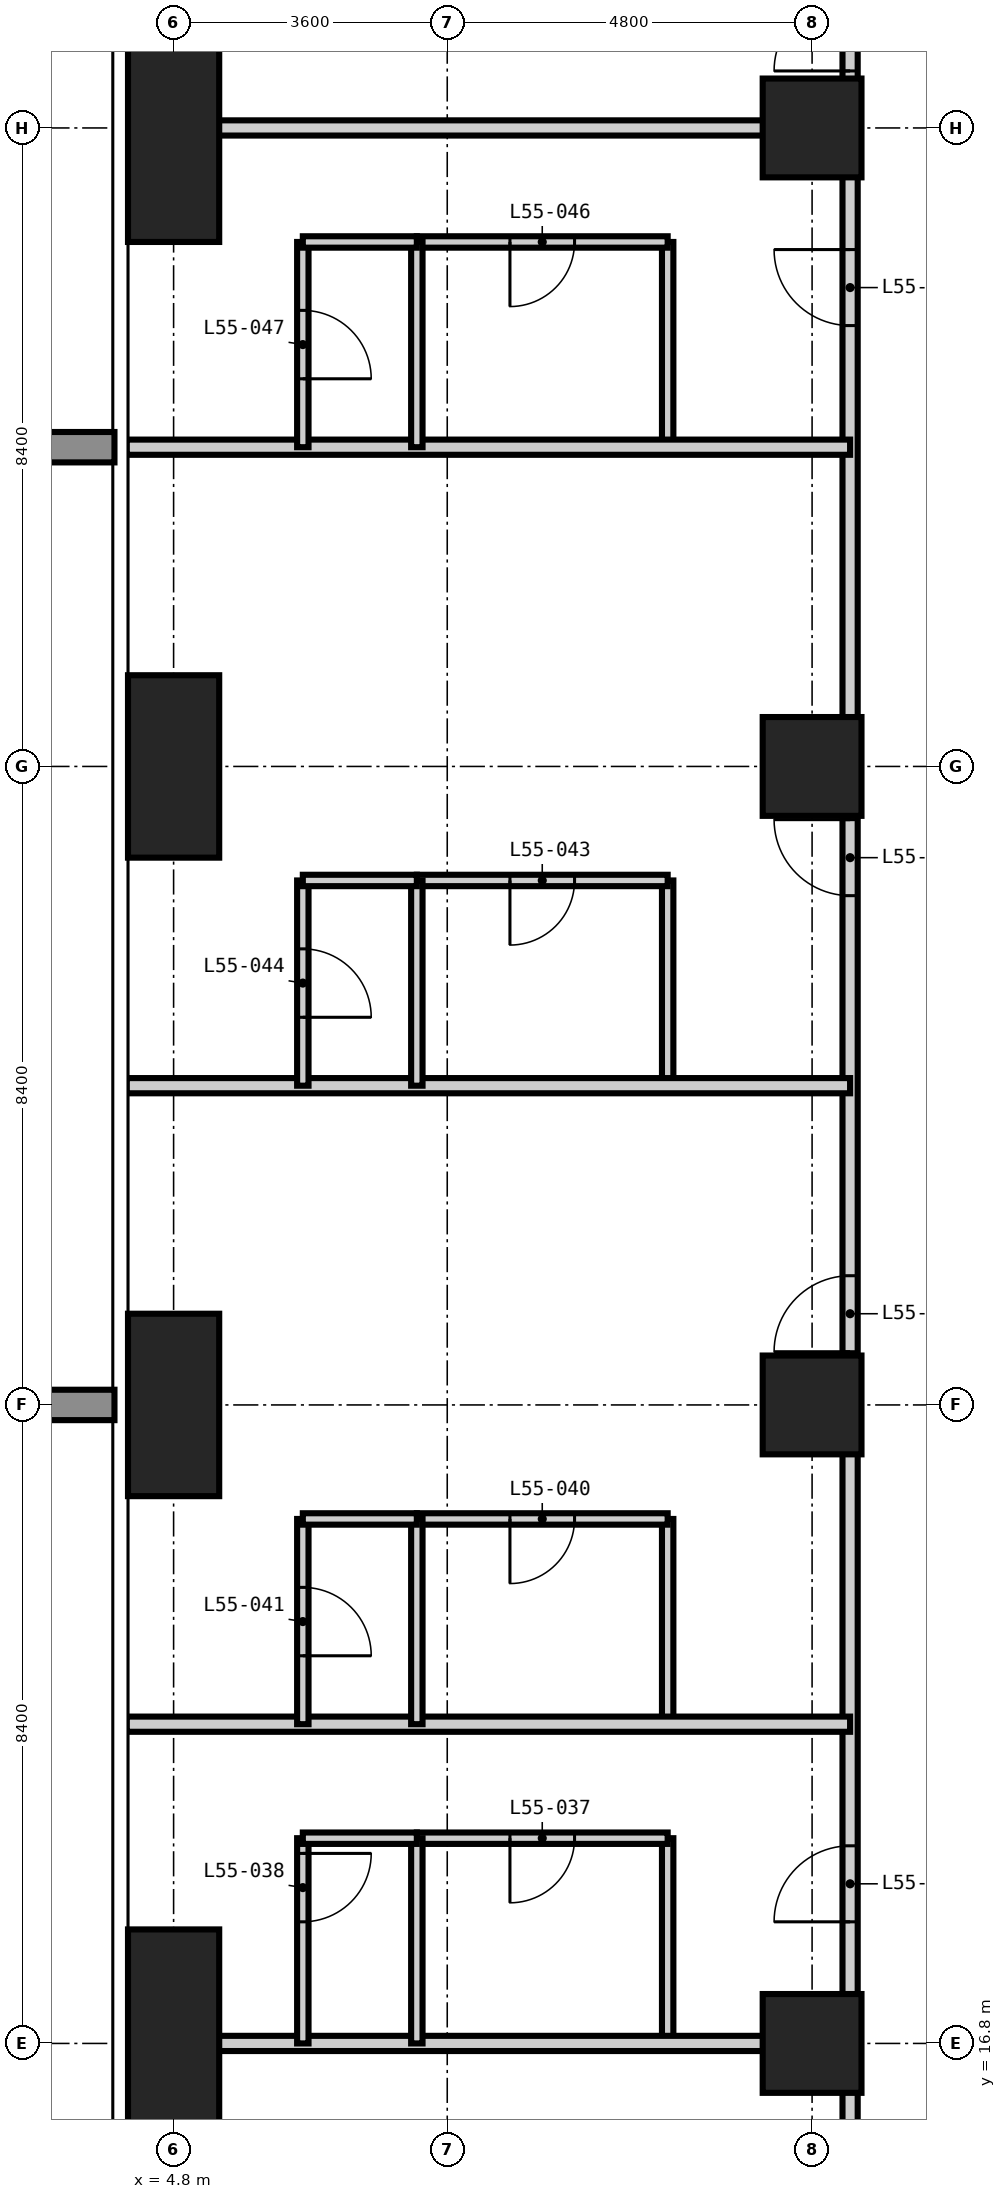
"""IFC4 building model, lengths in metres.
Left out: names, types, materials, properties, quantities, classifications, styles, units other than length and angle.
Written with IfcOpenShell. Run it as: python <this file> out.ifc"""

import sys

from ifc_helpers import new_model, si_unit, direction, frame, frame_2d, origin, origin_2d, place, context, subcontext, project, spatial, rectangle, extrude, element, fill, save


model = new_model("IFC4")
c1 = context("Model", 3, precision=1e-05, world=origin(), true_north=direction((0.0, 1.0)))
c2 = subcontext(c1, "Body", "Model", "MODEL_VIEW")
j1 = project(units=[si_unit("LENGTHUNIT", "METRE"), si_unit("PLANEANGLEUNIT", "RADIAN")], contexts=[c1])
p1 = place(None, origin())
s1 = spatial("IfcSite", under=j1, at=p1, CompositionType="ELEMENT")
p2 = place(p1, origin())
s2 = spatial("IfcBuilding", under=s1, at=p2, CompositionType="ELEMENT")
p3 = place(p2, frame((0.0, 0.0, 213.0)))
s3 = spatial("IfcBuildingStorey", under=s2, at=p3, CompositionType="ELEMENT", Elevation=213.0)
p4 = place(p3, frame((4.8, 16.8, -0.35), z_axis=(0.0, 0.0, 1.0), x_axis=(1.0, 0.0, 0.0)))
e1 = element("IfcColumn", 1, at=p4, inside=s3, PredefinedType="COLUMN", context=c2, shape_type="SweptSolid", body=[
    extrude(rectangle(XDim=1.2, YDim=3.0, at=origin_2d()), origin(), (0.0, 0.0, 1.0), 3.6),
])
for number, where, z_axis, x_axis in (
    (2, (4.8, 25.2, -0.35), (0.0, 0.0, 1.0), (1.0, 0.0, 0.0)),
    (3, (4.8, 33.6, -0.35), (0.0, 0.0, 1.0), (1.0, 0.0, 0.0)),
):
    element("IfcColumn", number, at=place(p3, frame(where, z_axis=z_axis, x_axis=x_axis)), inside=s3, PredefinedType="COLUMN", context=c2, shape_type="SweptSolid", body=[
        extrude(rectangle(XDim=1.2, YDim=2.4, at=origin_2d()), origin(), (0.0, 0.0, 1.0), 3.6),
    ])
p5 = place(p3, frame((4.8, 42.0, -0.35), z_axis=(0.0, 0.0, 1.0), x_axis=(1.0, 0.0, 0.0)))
e4 = element("IfcColumn", 4, at=p5, inside=s3, PredefinedType="COLUMN", context=c2, shape_type="SweptSolid", body=[
    extrude(rectangle(XDim=1.2, YDim=3.0, at=origin_2d()), origin(), (0.0, 0.0, 1.0), 3.6),
])
for number, where, z_axis, x_axis in (
    (5, (13.2, 16.8, -0.35), (0.0, 0.0, 1.0), (1.0, 0.0, 0.0)),
    (6, (13.2, 25.2, -0.35), (0.0, 0.0, 1.0), (1.0, 0.0, 0.0)),
    (7, (13.2, 33.6, -0.35), (0.0, 0.0, 1.0), (1.0, 0.0, 0.0)),
    (8, (13.2, 42.0, -0.35), (0.0, 0.0, 1.0), (1.0, 0.0, 0.0)),
):
    element("IfcColumn", number, at=place(p3, frame(where, z_axis=z_axis, x_axis=x_axis)), inside=s3, PredefinedType="COLUMN", context=c2, shape_type="SweptSolid", body=[
        extrude(rectangle(XDim=1.3, YDim=1.3, at=origin_2d()), origin(), (0.0, 0.0, 1.0), 3.6),
    ])
for number, where, z_axis, x_axis in (
    (9, (11.3, 16.8, 0.0), (0.0, 0.0, 1.0), (0.0, 1.0, 0.0)),
    (10, (11.3, 21.0, 0.0), (0.0, 0.0, 1.0), (0.0, 1.0, 0.0)),
):
    element("IfcWall", number, at=place(p3, frame(where, z_axis=z_axis, x_axis=x_axis)), inside=s3, PredefinedType="PARTITIONING", context=c2, shape_type="SweptSolid", body=[
        extrude(rectangle(XDim=2.7, YDim=0.15, at=frame_2d((1.35, 0.0))), origin(), (0.0, 0.0, 1.0), 3.25),
    ])
p6 = place(p3, frame((11.3, 29.4, 0.0), z_axis=(0.0, 0.0, 1.0), x_axis=(0.0, 1.0, 0.0)))
e11 = element("IfcWall", 11, at=p6, inside=s3, PredefinedType="PARTITIONING", context=c2, shape_type="SweptSolid", body=[
    extrude(rectangle(XDim=2.7, YDim=0.15, at=frame_2d((1.35, 0.0))), origin(), (0.0, 0.0, 1.0), 3.25),
])
p7 = place(p3, frame((11.3, 37.8, 0.0), z_axis=(0.0, 0.0, 1.0), x_axis=(0.0, 1.0, 0.0)))
e12 = element("IfcWall", 12, at=p7, inside=s3, PredefinedType="PARTITIONING", context=c2, shape_type="SweptSolid", body=[
    extrude(rectangle(XDim=2.7, YDim=0.15, at=frame_2d((1.35, 0.0))), origin(), (0.0, 0.0, 1.0), 3.25),
])
p8 = place(p3, frame((8.0, 19.5, 0.0), z_axis=(0.0, 0.0, 1.0), x_axis=(1.0, 0.0, 0.0)))
e13 = element("IfcWall", 13, at=p8, inside=s3, PredefinedType="PARTITIONING", context=c2, shape_type="SweptSolid", body=[
    extrude(rectangle(XDim=3.3, YDim=0.15, at=frame_2d((1.65, 0.0))), origin(), (0.0, 0.0, 1.0), 3.25),
])
p9 = place(p8, frame((1.225, 0.0, 0.0)))
e14 = element("IfcOpeningElement", 14, at=p9, cuts=e13, PredefinedType="OPENING", context=c2, shape_type="SweptSolid", body=[
    extrude(rectangle(XDim=0.85, YDim=2.1, at=frame_2d((0.425, 1.05))), frame((0.0, 0.085, 0.0), z_axis=(0.0, -1.0, 0.0), x_axis=(1.0, 0.0, 0.0)), (0.0, 0.0, 1.0), 0.17),
])
p10 = place(p3, frame((8.0, 23.7, 0.0), z_axis=(0.0, 0.0, 1.0), x_axis=(1.0, 0.0, 0.0)))
e15 = element("IfcWall", 15, at=p10, inside=s3, PredefinedType="PARTITIONING", context=c2, shape_type="SweptSolid", body=[
    extrude(rectangle(XDim=3.3, YDim=0.15, at=frame_2d((1.65, 0.0))), origin(), (0.0, 0.0, 1.0), 3.25),
])
p11 = place(p10, frame((1.225, 0.0, 0.0)))
e16 = element("IfcOpeningElement", 16, at=p11, cuts=e15, PredefinedType="OPENING", context=c2, shape_type="SweptSolid", body=[
    extrude(rectangle(XDim=0.85, YDim=2.1, at=frame_2d((0.425, 1.05))), frame((0.0, 0.085, 0.0), z_axis=(0.0, -1.0, 0.0), x_axis=(1.0, 0.0, 0.0)), (0.0, 0.0, 1.0), 0.17),
])
p12 = place(p3, frame((8.0, 32.1, 0.0), z_axis=(0.0, 0.0, 1.0), x_axis=(1.0, 0.0, 0.0)))
e17 = element("IfcWall", 17, at=p12, inside=s3, PredefinedType="PARTITIONING", context=c2, shape_type="SweptSolid", body=[
    extrude(rectangle(XDim=3.3, YDim=0.15, at=frame_2d((1.65, 0.0))), origin(), (0.0, 0.0, 1.0), 3.25),
])
p13 = place(p12, frame((1.225, 0.0, 0.0)))
e18 = element("IfcOpeningElement", 18, at=p13, cuts=e17, PredefinedType="OPENING", context=c2, shape_type="SweptSolid", body=[
    extrude(rectangle(XDim=0.85, YDim=2.1, at=frame_2d((0.425, 1.05))), frame((0.0, 0.085, 0.0), z_axis=(0.0, -1.0, 0.0), x_axis=(1.0, 0.0, 0.0)), (0.0, 0.0, 1.0), 0.17),
])
p14 = place(p3, frame((8.0, 40.5, 0.0), z_axis=(0.0, 0.0, 1.0), x_axis=(1.0, 0.0, 0.0)))
e19 = element("IfcWall", 19, at=p14, inside=s3, PredefinedType="PARTITIONING", context=c2, shape_type="SweptSolid", body=[
    extrude(rectangle(XDim=3.3, YDim=0.15, at=frame_2d((1.65, 0.0))), origin(), (0.0, 0.0, 1.0), 3.25),
])
p15 = place(p14, frame((1.225, 0.0, 0.0)))
e20 = element("IfcOpeningElement", 20, at=p15, cuts=e19, PredefinedType="OPENING", context=c2, shape_type="SweptSolid", body=[
    extrude(rectangle(XDim=0.85, YDim=2.1, at=frame_2d((0.425, 1.05))), frame((0.0, 0.085, 0.0), z_axis=(0.0, -1.0, 0.0), x_axis=(1.0, 0.0, 0.0)), (0.0, 0.0, 1.0), 0.17),
])
p16 = place(p3, frame((13.7, 13.7, 0.0), z_axis=(0.0, 0.0, 1.0), x_axis=(0.0, 1.0, 0.0)))
e21 = element("IfcWall", 21, at=p16, inside=s3, PredefinedType="PARTITIONING", context=c2, shape_type="SweptSolid", body=[
    extrude(rectangle(XDim=30.8, YDim=0.2, at=frame_2d((15.4, 0.0))), origin(), (0.0, 0.0, 1.0), 3.25),
])
p17 = place(p16, frame((4.7, 0.0, 0.0)))
e22 = element("IfcOpeningElement", 22, at=p17, cuts=e21, PredefinedType="OPENING", context=c2, shape_type="SweptSolid", body=[
    extrude(rectangle(XDim=1.0, YDim=2.2, at=frame_2d((0.5, 1.1))), frame((0.0, 0.11, 0.0), z_axis=(0.0, -1.0, 0.0), x_axis=(1.0, 0.0, 0.0)), (0.0, 0.0, 1.0), 0.22),
])
p18 = place(p16, frame((12.2, 0.0, 0.0)))
e23 = element("IfcOpeningElement", 23, at=p18, cuts=e21, PredefinedType="OPENING", context=c2, shape_type="SweptSolid", body=[
    extrude(rectangle(XDim=1.0, YDim=2.2, at=frame_2d((0.5, 1.1))), frame((0.0, 0.11, 0.0), z_axis=(0.0, -1.0, 0.0), x_axis=(1.0, 0.0, 0.0)), (0.0, 0.0, 1.0), 0.22),
])
p19 = place(p16, frame((18.2, 0.0, 0.0)))
e24 = element("IfcOpeningElement", 24, at=p19, cuts=e21, PredefinedType="OPENING", context=c2, shape_type="SweptSolid", body=[
    extrude(rectangle(XDim=1.0, YDim=2.2, at=frame_2d((0.5, 1.1))), frame((0.0, 0.11, 0.0), z_axis=(0.0, -1.0, 0.0), x_axis=(1.0, 0.0, 0.0)), (0.0, 0.0, 1.0), 0.22),
])
p20 = place(p16, frame((25.7, 0.0, 0.0)))
e25 = element("IfcOpeningElement", 25, at=p20, cuts=e21, PredefinedType="OPENING", context=c2, shape_type="SweptSolid", body=[
    extrude(rectangle(XDim=1.0, YDim=2.2, at=frame_2d((0.5, 1.1))), frame((0.0, 0.11, 0.0), z_axis=(0.0, -1.0, 0.0), x_axis=(1.0, 0.0, 0.0)), (0.0, 0.0, 1.0), 0.22),
])
p21 = place(p16, frame((1.05, 0.0, 0.0)))
e26 = element("IfcOpeningElement", 26, at=p21, cuts=e21, PredefinedType="OPENING", context=c2, shape_type="SweptSolid", body=[
    extrude(rectangle(XDim=1.0, YDim=2.2, at=frame_2d((0.5, 1.1))), frame((0.0, 0.11, 0.0), z_axis=(0.0, -1.0, 0.0), x_axis=(1.0, 0.0, 0.0)), (0.0, 0.0, 1.0), 0.22),
])
p22 = place(p16, frame((29.05, 0.0, 0.0)))
e27 = element("IfcOpeningElement", 27, at=p22, cuts=e21, PredefinedType="OPENING", context=c2, shape_type="SweptSolid", body=[
    extrude(rectangle(XDim=1.0, YDim=2.2, at=frame_2d((0.5, 1.1))), frame((0.0, 0.11, 0.0), z_axis=(0.0, -1.0, 0.0), x_axis=(1.0, 0.0, 0.0)), (0.0, 0.0, 1.0), 0.22),
])
for number, where, z_axis, x_axis in (
    (28, (4.182, 16.8, 0.0), (0.0, 0.0, 1.0), (1.0, 0.0, 0.0)),
    (29, (4.182, 21.0, 0.0), (0.0, 0.0, 1.0), (1.0, 0.0, 0.0)),
    (30, (4.182, 29.4, 0.0), (0.0, 0.0, 1.0), (1.0, 0.0, 0.0)),
    (31, (4.182, 37.8, 0.0), (0.0, 0.0, 1.0), (1.0, 0.0, 0.0)),
    (32, (4.182, 42.0, 0.0), (0.0, 0.0, 1.0), (1.0, 0.0, 0.0)),
):
    element("IfcWall", number, at=place(p3, frame(where, z_axis=z_axis, x_axis=x_axis)), inside=s3, PredefinedType="PARTITIONING", context=c2, shape_type="SweptSolid", body=[
        extrude(rectangle(XDim=9.518, YDim=0.2, at=frame_2d((4.759, 0.0))), origin(), (0.0, 0.0, 1.0), 3.25),
    ])
p23 = place(p3, frame((6.5, 16.8, 0.0), z_axis=(0.0, 0.0, 1.0), x_axis=(0.0, 1.0, 0.0)))
e33 = element("IfcWall", 33, at=p23, inside=s3, PredefinedType="PARTITIONING", context=c2, shape_type="SweptSolid", body=[
    extrude(rectangle(XDim=2.7, YDim=0.15, at=frame_2d((1.35, 0.0))), origin(), (0.0, 0.0, 1.0), 3.25),
])
p24 = place(p23, frame((1.6, 0.0, 0.0)))
e34 = element("IfcOpeningElement", 34, at=p24, cuts=e33, PredefinedType="OPENING", context=c2, shape_type="SweptSolid", body=[
    extrude(rectangle(XDim=0.9, YDim=2.1, at=frame_2d((0.45, 1.05))), frame((0.0, 0.085, 0.0), z_axis=(0.0, -1.0, 0.0), x_axis=(1.0, 0.0, 0.0)), (0.0, 0.0, 1.0), 0.17),
])
p25 = place(p3, frame((6.5, 21.0, 0.0), z_axis=(0.0, 0.0, 1.0), x_axis=(0.0, 1.0, 0.0)))
e35 = element("IfcWall", 35, at=p25, inside=s3, PredefinedType="PARTITIONING", context=c2, shape_type="SweptSolid", body=[
    extrude(rectangle(XDim=2.7, YDim=0.15, at=frame_2d((1.35, 0.0))), origin(), (0.0, 0.0, 1.0), 3.25),
])
p26 = place(p25, frame((0.9, 0.0, 0.0)))
e36 = element("IfcOpeningElement", 36, at=p26, cuts=e35, PredefinedType="OPENING", context=c2, shape_type="SweptSolid", body=[
    extrude(rectangle(XDim=0.9, YDim=2.1, at=frame_2d((0.45, 1.05))), frame((0.0, 0.085, 0.0), z_axis=(0.0, -1.0, 0.0), x_axis=(1.0, 0.0, 0.0)), (0.0, 0.0, 1.0), 0.17),
])
p27 = place(p3, frame((6.5, 29.4, 0.0), z_axis=(0.0, 0.0, 1.0), x_axis=(0.0, 1.0, 0.0)))
e37 = element("IfcWall", 37, at=p27, inside=s3, PredefinedType="PARTITIONING", context=c2, shape_type="SweptSolid", body=[
    extrude(rectangle(XDim=2.7, YDim=0.15, at=frame_2d((1.35, 0.0))), origin(), (0.0, 0.0, 1.0), 3.25),
])
p28 = place(p27, frame((0.9, 0.0, 0.0)))
e38 = element("IfcOpeningElement", 38, at=p28, cuts=e37, PredefinedType="OPENING", context=c2, shape_type="SweptSolid", body=[
    extrude(rectangle(XDim=0.9, YDim=2.1, at=frame_2d((0.45, 1.05))), frame((0.0, 0.085, 0.0), z_axis=(0.0, -1.0, 0.0), x_axis=(1.0, 0.0, 0.0)), (0.0, 0.0, 1.0), 0.17),
])
p29 = place(p3, frame((6.5, 37.8, 0.0), z_axis=(0.0, 0.0, 1.0), x_axis=(0.0, 1.0, 0.0)))
e39 = element("IfcWall", 39, at=p29, inside=s3, PredefinedType="PARTITIONING", context=c2, shape_type="SweptSolid", body=[
    extrude(rectangle(XDim=2.7, YDim=0.15, at=frame_2d((1.35, 0.0))), origin(), (0.0, 0.0, 1.0), 3.25),
])
p30 = place(p29, frame((0.9, 0.0, 0.0)))
e40 = element("IfcOpeningElement", 40, at=p30, cuts=e39, PredefinedType="OPENING", context=c2, shape_type="SweptSolid", body=[
    extrude(rectangle(XDim=0.9, YDim=2.1, at=frame_2d((0.45, 1.05))), frame((0.0, 0.085, 0.0), z_axis=(0.0, -1.0, 0.0), x_axis=(1.0, 0.0, 0.0)), (0.0, 0.0, 1.0), 0.17),
])
for number, where, z_axis, x_axis in (
    (41, (8.0, 16.8, 0.0), (0.0, 0.0, 1.0), (0.0, 1.0, 0.0)),
    (42, (8.0, 21.0, 0.0), (0.0, 0.0, 1.0), (0.0, 1.0, 0.0)),
):
    element("IfcWall", number, at=place(p3, frame(where, z_axis=z_axis, x_axis=x_axis)), inside=s3, PredefinedType="PARTITIONING", context=c2, shape_type="SweptSolid", body=[
        extrude(rectangle(XDim=2.7, YDim=0.15, at=frame_2d((1.35, 0.0))), origin(), (0.0, 0.0, 1.0), 3.25),
    ])
p31 = place(p3, frame((8.0, 29.4, 0.0), z_axis=(0.0, 0.0, 1.0), x_axis=(0.0, 1.0, 0.0)))
e43 = element("IfcWall", 43, at=p31, inside=s3, PredefinedType="PARTITIONING", context=c2, shape_type="SweptSolid", body=[
    extrude(rectangle(XDim=2.7, YDim=0.15, at=frame_2d((1.35, 0.0))), origin(), (0.0, 0.0, 1.0), 3.25),
])
p32 = place(p3, frame((8.0, 37.8, 0.0), z_axis=(0.0, 0.0, 1.0), x_axis=(0.0, 1.0, 0.0)))
e44 = element("IfcWall", 44, at=p32, inside=s3, PredefinedType="PARTITIONING", context=c2, shape_type="SweptSolid", body=[
    extrude(rectangle(XDim=2.7, YDim=0.15, at=frame_2d((1.35, 0.0))), origin(), (0.0, 0.0, 1.0), 3.25),
])
for number, where, z_axis, x_axis in (
    (45, (6.5, 19.5, 0.0), (0.0, 0.0, 1.0), (1.0, 0.0, 0.0)),
    (46, (6.5, 23.7, 0.0), (0.0, 0.0, 1.0), (1.0, 0.0, 0.0)),
    (47, (6.5, 32.1, 0.0), (0.0, 0.0, 1.0), (1.0, 0.0, 0.0)),
    (48, (6.5, 40.5, 0.0), (0.0, 0.0, 1.0), (1.0, 0.0, 0.0)),
):
    element("IfcWall", number, at=place(p3, frame(where, z_axis=z_axis, x_axis=x_axis)), inside=s3, PredefinedType="PARTITIONING", context=c2, shape_type="SweptSolid", body=[
        extrude(rectangle(XDim=1.5, YDim=0.15, at=frame_2d((0.75, 0.0))), origin(), (0.0, 0.0, 1.0), 3.25),
    ])
p33 = place(p17, origin())
e49 = element("IfcDoor", 49, at=p33, inside=s3, OperationType="SINGLE_SWING_LEFT", PredefinedType="DOOR", context=c2, shape_type="SweptSolid", body=[
    extrude(rectangle(XDim=1.0, YDim=2.2, at=frame_2d((0.5, 1.1))), frame((0.0, 0.025, 0.0), z_axis=(0.0, -1.0, 0.0), x_axis=(1.0, 0.0, 0.0)), (0.0, 0.0, 1.0), 0.05),
])
fill(e22, e49)
p34 = place(p9, frame((0.85, 0.0, 0.0), z_axis=(0.0, 0.0, 1.0), x_axis=(-1.0, 0.0, 0.0)))
e50 = element("IfcDoor", 50, at=p34, inside=s3, OperationType="SINGLE_SWING_RIGHT", PredefinedType="DOOR", context=c2, shape_type="SweptSolid", body=[
    extrude(rectangle(XDim=0.85, YDim=2.1, at=frame_2d((0.425, 1.05))), frame((0.0, 0.025, 0.0), z_axis=(0.0, -1.0, 0.0), x_axis=(1.0, 0.0, 0.0)), (0.0, 0.0, 1.0), 0.05),
])
fill(e14, e50)
p35 = place(p24, frame((0.9, 0.0, 0.0), z_axis=(0.0, 0.0, 1.0), x_axis=(-1.0, 0.0, 0.0)))
e51 = element("IfcDoor", 51, at=p35, inside=s3, OperationType="SINGLE_SWING_LEFT", PredefinedType="DOOR", context=c2, shape_type="SweptSolid", body=[
    extrude(rectangle(XDim=0.9, YDim=2.1, at=frame_2d((0.45, 1.05))), frame((0.0, 0.025, 0.0), z_axis=(0.0, -1.0, 0.0), x_axis=(1.0, 0.0, 0.0)), (0.0, 0.0, 1.0), 0.05),
])
fill(e34, e51)
p36 = place(p18, origin())
e52 = element("IfcDoor", 52, at=p36, inside=s3, OperationType="SINGLE_SWING_LEFT", PredefinedType="DOOR", context=c2, shape_type="SweptSolid", body=[
    extrude(rectangle(XDim=1.0, YDim=2.2, at=frame_2d((0.5, 1.1))), frame((0.0, 0.025, 0.0), z_axis=(0.0, -1.0, 0.0), x_axis=(1.0, 0.0, 0.0)), (0.0, 0.0, 1.0), 0.05),
])
fill(e23, e52)
p37 = place(p11, frame((0.85, 0.0, 0.0), z_axis=(0.0, 0.0, 1.0), x_axis=(-1.0, 0.0, 0.0)))
e53 = element("IfcDoor", 53, at=p37, inside=s3, OperationType="SINGLE_SWING_RIGHT", PredefinedType="DOOR", context=c2, shape_type="SweptSolid", body=[
    extrude(rectangle(XDim=0.85, YDim=2.1, at=frame_2d((0.425, 1.05))), frame((0.0, 0.025, 0.0), z_axis=(0.0, -1.0, 0.0), x_axis=(1.0, 0.0, 0.0)), (0.0, 0.0, 1.0), 0.05),
])
fill(e16, e53)
p38 = place(p26, frame((0.9, 0.0, 0.0), z_axis=(0.0, 0.0, 1.0), x_axis=(-1.0, 0.0, 0.0)))
e54 = element("IfcDoor", 54, at=p38, inside=s3, OperationType="SINGLE_SWING_RIGHT", PredefinedType="DOOR", context=c2, shape_type="SweptSolid", body=[
    extrude(rectangle(XDim=0.9, YDim=2.1, at=frame_2d((0.45, 1.05))), frame((0.0, 0.025, 0.0), z_axis=(0.0, -1.0, 0.0), x_axis=(1.0, 0.0, 0.0)), (0.0, 0.0, 1.0), 0.05),
])
fill(e36, e54)
p39 = place(p19, origin())
e55 = element("IfcDoor", 55, at=p39, inside=s3, OperationType="SINGLE_SWING_RIGHT", PredefinedType="DOOR", context=c2, shape_type="SweptSolid", body=[
    extrude(rectangle(XDim=1.0, YDim=2.2, at=frame_2d((0.5, 1.1))), frame((0.0, 0.025, 0.0), z_axis=(0.0, -1.0, 0.0), x_axis=(1.0, 0.0, 0.0)), (0.0, 0.0, 1.0), 0.05),
])
fill(e24, e55)
p40 = place(p13, frame((0.85, 0.0, 0.0), z_axis=(0.0, 0.0, 1.0), x_axis=(-1.0, 0.0, 0.0)))
e56 = element("IfcDoor", 56, at=p40, inside=s3, OperationType="SINGLE_SWING_RIGHT", PredefinedType="DOOR", context=c2, shape_type="SweptSolid", body=[
    extrude(rectangle(XDim=0.85, YDim=2.1, at=frame_2d((0.425, 1.05))), frame((0.0, 0.025, 0.0), z_axis=(0.0, -1.0, 0.0), x_axis=(1.0, 0.0, 0.0)), (0.0, 0.0, 1.0), 0.05),
])
fill(e18, e56)
p41 = place(p28, frame((0.9, 0.0, 0.0), z_axis=(0.0, 0.0, 1.0), x_axis=(-1.0, 0.0, 0.0)))
e57 = element("IfcDoor", 57, at=p41, inside=s3, OperationType="SINGLE_SWING_RIGHT", PredefinedType="DOOR", context=c2, shape_type="SweptSolid", body=[
    extrude(rectangle(XDim=0.9, YDim=2.1, at=frame_2d((0.45, 1.05))), frame((0.0, 0.025, 0.0), z_axis=(0.0, -1.0, 0.0), x_axis=(1.0, 0.0, 0.0)), (0.0, 0.0, 1.0), 0.05),
])
fill(e38, e57)
p42 = place(p20, origin())
e58 = element("IfcDoor", 58, at=p42, inside=s3, OperationType="SINGLE_SWING_RIGHT", PredefinedType="DOOR", context=c2, shape_type="SweptSolid", body=[
    extrude(rectangle(XDim=1.0, YDim=2.2, at=frame_2d((0.5, 1.1))), frame((0.0, 0.025, 0.0), z_axis=(0.0, -1.0, 0.0), x_axis=(1.0, 0.0, 0.0)), (0.0, 0.0, 1.0), 0.05),
])
fill(e25, e58)
p43 = place(p15, frame((0.85, 0.0, 0.0), z_axis=(0.0, 0.0, 1.0), x_axis=(-1.0, 0.0, 0.0)))
e59 = element("IfcDoor", 59, at=p43, inside=s3, OperationType="SINGLE_SWING_RIGHT", PredefinedType="DOOR", context=c2, shape_type="SweptSolid", body=[
    extrude(rectangle(XDim=0.85, YDim=2.1, at=frame_2d((0.425, 1.05))), frame((0.0, 0.025, 0.0), z_axis=(0.0, -1.0, 0.0), x_axis=(1.0, 0.0, 0.0)), (0.0, 0.0, 1.0), 0.05),
])
fill(e20, e59)
p44 = place(p30, frame((0.9, 0.0, 0.0), z_axis=(0.0, 0.0, 1.0), x_axis=(-1.0, 0.0, 0.0)))
e60 = element("IfcDoor", 60, at=p44, inside=s3, OperationType="SINGLE_SWING_RIGHT", PredefinedType="DOOR", context=c2, shape_type="SweptSolid", body=[
    extrude(rectangle(XDim=0.9, YDim=2.1, at=frame_2d((0.45, 1.05))), frame((0.0, 0.025, 0.0), z_axis=(0.0, -1.0, 0.0), x_axis=(1.0, 0.0, 0.0)), (0.0, 0.0, 1.0), 0.05),
])
fill(e40, e60)
p45 = place(p22, origin())
e61 = element("IfcDoor", 61, at=p45, inside=s3, OperationType="SINGLE_SWING_LEFT", PredefinedType="DOOR", context=c2, shape_type="SweptSolid", body=[
    extrude(rectangle(XDim=1.0, YDim=2.2, at=frame_2d((0.5, 1.1))), frame((0.0, 0.025, 0.0), z_axis=(0.0, -1.0, 0.0), x_axis=(1.0, 0.0, 0.0)), (0.0, 0.0, 1.0), 0.05),
])
fill(e27, e61)
save(model, sys.argv[1])
